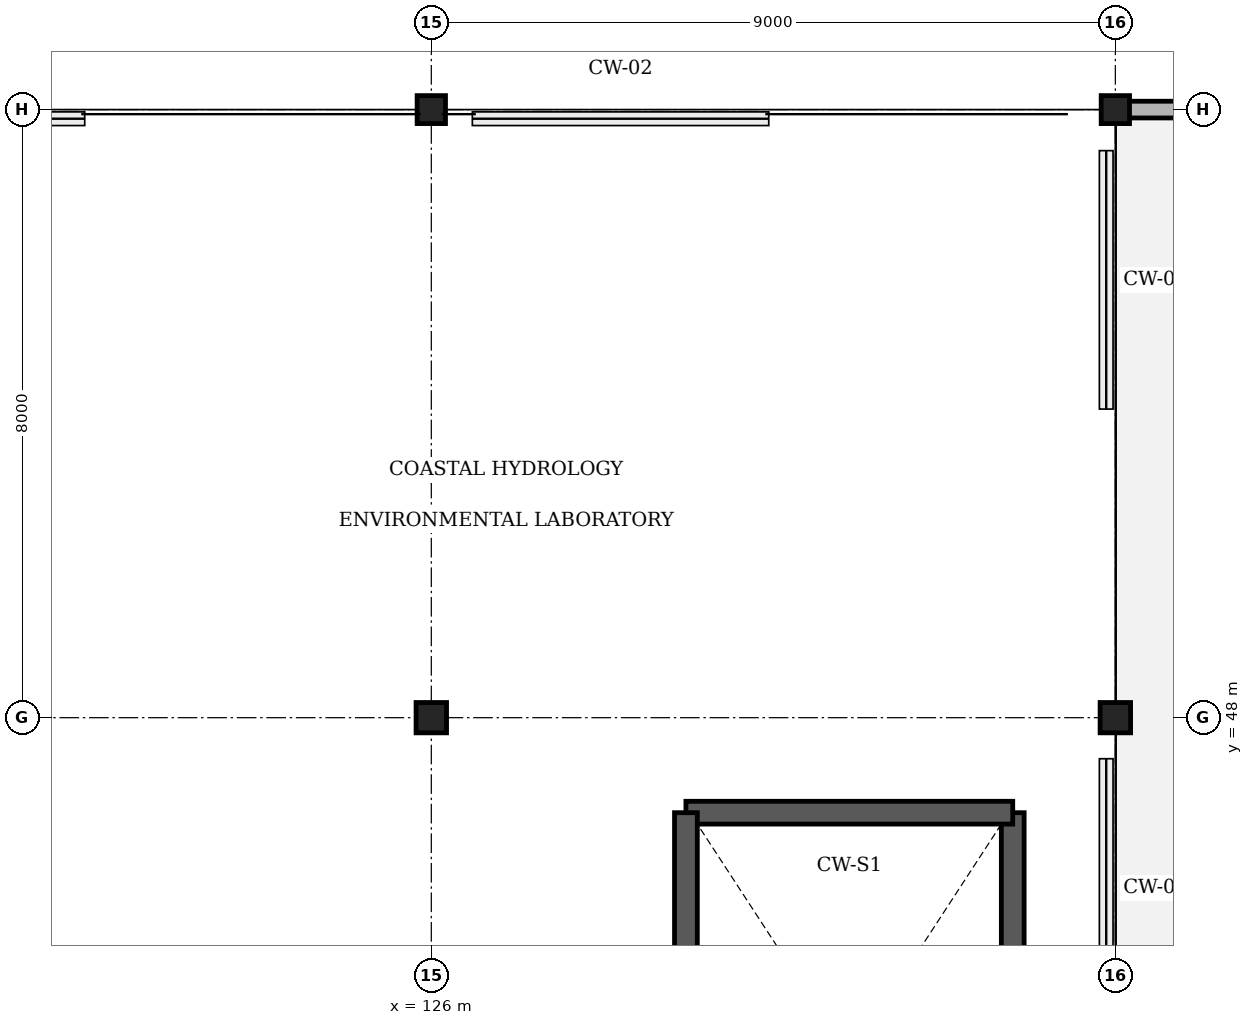
"""IFC4 building model, lengths in metres.
Left out: names, types, materials, properties, quantities, classifications, styles, units other than length and angle.
Written with IfcOpenShell. Run it as: python <this file> out.ifc"""

import sys

from ifc_helpers import new_model, si_unit, direction, frame, frame_2d, origin, origin_2d, place, context, subcontext, project, spatial, rectangle, i_section, extrude, element, save


model = new_model("IFC4")
c1 = context("Model", 3, precision=1e-05, world=origin(), true_north=direction((0.0, 1.0)))
c2 = subcontext(c1, "Body", "Model", "MODEL_VIEW")
j1 = project(units=[si_unit("LENGTHUNIT", "METRE"), si_unit("PLANEANGLEUNIT", "RADIAN")], contexts=[c1])
p1 = place(None, origin())
s1 = spatial("IfcSite", under=j1, at=p1, CompositionType="ELEMENT")
p2 = place(p1, origin())
s2 = spatial("IfcBuilding", under=s1, at=p2, CompositionType="ELEMENT")
p3 = place(p2, frame((0.0, 0.0, 15.6)))
s3 = spatial("IfcBuildingStorey", under=s2, at=p3, CompositionType="ELEMENT", Elevation=15.6)
p4 = place(p3, frame((126.0, 48.0, 0.0), z_axis=(0.0, 0.0, 1.0), x_axis=(1.0, 0.0, 0.0)))
e1 = element("IfcColumn", 1, at=p4, inside=s3, PredefinedType="COLUMN", context=c2, shape_type="SweptSolid", body=[
    extrude(i_section(OverallWidth=0.401, OverallDepth=0.399, WebThickness=0.025, FlangeThickness=0.04, FilletRadius=0.015, at=origin_2d()), origin(), (0.0, 0.0, 1.0), 6.25),
])
p5 = place(p3, frame((126.0, 56.0, 0.0), z_axis=(0.0, 0.0, 1.0), x_axis=(1.0, 0.0, 0.0)))
e2 = element("IfcColumn", 2, at=p5, inside=s3, PredefinedType="COLUMN", context=c2, shape_type="SweptSolid", body=[
    extrude(i_section(OverallWidth=0.373, OverallDepth=0.368, WebThickness=0.015, FlangeThickness=0.024, FilletRadius=0.015, at=origin_2d()), origin(), (0.0, 0.0, 1.0), 6.25),
])
p6 = place(p3, frame((135.0, 48.0, 0.0), z_axis=(0.0, 0.0, 1.0), x_axis=(1.0, 0.0, 0.0)))
e3 = element("IfcColumn", 3, at=p6, inside=s3, PredefinedType="COLUMN", context=c2, shape_type="SweptSolid", body=[
    extrude(i_section(OverallWidth=0.401, OverallDepth=0.399, WebThickness=0.025, FlangeThickness=0.04, FilletRadius=0.015, at=origin_2d()), origin(), (0.0, 0.0, 1.0), 6.25),
])
p7 = place(p3, frame((135.0, 56.0, 0.0), z_axis=(0.0, 0.0, 1.0), x_axis=(1.0, 0.0, 0.0)))
e4 = element("IfcColumn", 4, at=p7, inside=s3, PredefinedType="COLUMN", context=c2, shape_type="SweptSolid", body=[
    extrude(i_section(OverallWidth=0.373, OverallDepth=0.368, WebThickness=0.015, FlangeThickness=0.024, FilletRadius=0.015, at=origin_2d()), origin(), (0.0, 0.0, 1.0), 6.25),
])
p8 = place(p3, frame((135.0, 56.0, 0.0), z_axis=(0.0, 0.0, 1.0), x_axis=(1.0, 0.0, 0.0)))
e5 = element("IfcWall", 5, at=p8, inside=s3, PredefinedType="PARAPET", context=c2, shape_type="SweptSolid", body=[
    extrude(rectangle(XDim=9.0, YDim=0.22, at=frame_2d((4.5, 0.0))), origin(), (0.0, 0.0, 1.0), 1.1),
])
p9 = place(p3, frame((133.65, 38.35, 0.0), z_axis=(0.0, 0.0, 1.0), x_axis=(0.0, 1.0, 0.0)))
e6 = element("IfcWall", 6, at=p9, inside=s3, PredefinedType="SOLIDWALL", context=c2, shape_type="SweptSolid", body=[
    extrude(rectangle(XDim=8.4, YDim=0.3, at=frame_2d((4.2, 0.0))), origin(), (0.0, 0.0, 1.0), 4.8),
])
p10 = place(p3, frame((133.65, 46.75, 0.0), z_axis=(0.0, 0.0, 1.0), x_axis=(-1.0, 0.0, 0.0)))
e7 = element("IfcWall", 7, at=p10, inside=s3, PredefinedType="SOLIDWALL", context=c2, shape_type="SweptSolid", body=[
    extrude(rectangle(XDim=4.3, YDim=0.3, at=frame_2d((2.15, 0.0))), origin(), (0.0, 0.0, 1.0), 4.8),
])
p11 = place(p3, frame((129.35, 38.35, 0.0), z_axis=(0.0, 0.0, 1.0), x_axis=(0.0, 1.0, 0.0)))
e8 = element("IfcWall", 8, at=p11, inside=s3, PredefinedType="SOLIDWALL", context=c2, shape_type="SweptSolid", body=[
    extrude(rectangle(XDim=8.4, YDim=0.3, at=frame_2d((4.2, 0.0))), origin(), (0.0, 0.0, 1.0), 4.8),
])
save(model, sys.argv[1])
